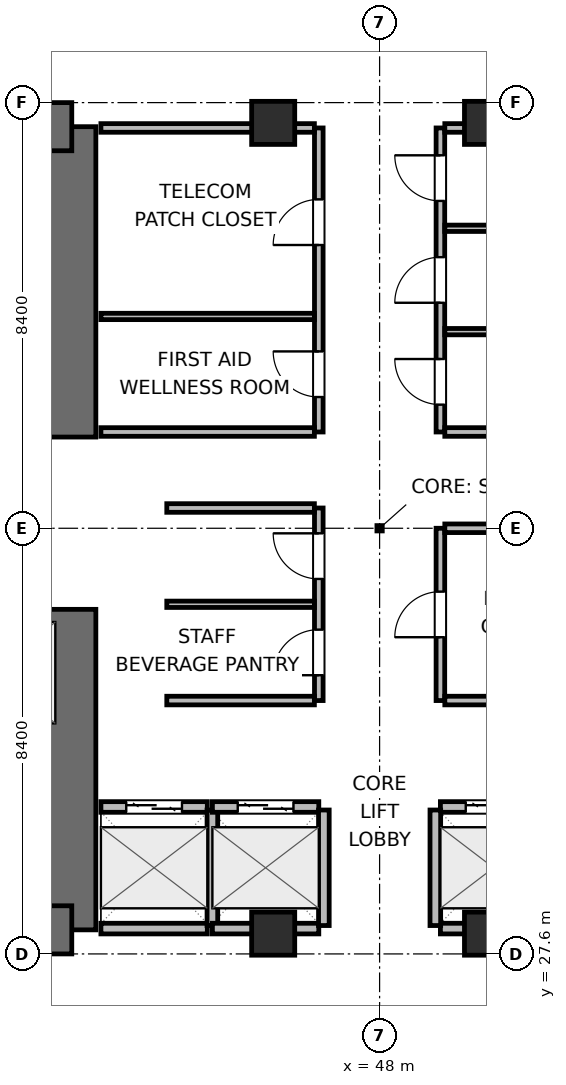
"""IFC4 building model, lengths in metres.
Left out: names, types, materials, properties, quantities, classifications, styles, units other than length and angle.
Written with IfcOpenShell. Run it as: python <this file> out.ifc"""

import sys

from ifc_helpers import new_model, si_unit, direction, frame, frame_2d, origin, origin_2d, place, context, subcontext, project, spatial, rectangle, extrude, element, fill, save


model = new_model("IFC4")
c1 = context("Model", 3, precision=1e-05, world=origin(), true_north=direction((0.0, 1.0)))
c2 = subcontext(c1, "Body", "Model", "MODEL_VIEW")
j1 = project(units=[si_unit("LENGTHUNIT", "METRE"), si_unit("PLANEANGLEUNIT", "RADIAN")], contexts=[c1])
p1 = place(None, origin())
s1 = spatial("IfcSite", under=j1, at=p1, CompositionType="ELEMENT")
p2 = place(p1, origin())
s2 = spatial("IfcBuilding", under=s1, at=p2, CompositionType="ELEMENT")
p3 = place(p2, frame((0.0, 0.0, 60.6)))
s3 = spatial("IfcBuildingStorey", under=s2, at=p3, CompositionType="ELEMENT", Elevation=60.6)
p4 = place(p3, frame((41.925, 28.075, 0.0), z_axis=(0.0, 0.0, 1.0), x_axis=(0.0, 1.0, 0.0)))
e1 = element("IfcWall", 1, at=p4, inside=s3, PredefinedType="SHEAR", context=c2, shape_type="SweptSolid", body=[
    extrude(rectangle(XDim=6.325, YDim=0.95, at=frame_2d((3.163, 0.0))), origin(), (0.0, 0.0, 1.0), 3.9),
])
p5 = place(p3, frame((41.925, 37.8, 0.0), z_axis=(0.0, 0.0, 1.0), x_axis=(0.0, 1.0, 0.0)))
e2 = element("IfcWall", 2, at=p5, inside=s3, PredefinedType="SHEAR", context=c2, shape_type="SweptSolid", body=[
    extrude(rectangle(XDim=6.125, YDim=0.95, at=frame_2d((3.062, 0.0))), origin(), (0.0, 0.0, 1.0), 3.9),
])
p6 = place(p3, frame((32.875, 28.075, 0.0), z_axis=(0.0, 0.0, 1.0), x_axis=(1.0, 0.0, 0.0)))
e3 = element("IfcWall", 3, at=p6, inside=s3, PredefinedType="SHEAR", context=c2, shape_type="SweptSolid", body=[
    extrude(rectangle(XDim=9.05, YDim=0.95, at=frame_2d((4.525, 0.0))), origin(), (0.0, 0.0, 1.0), 3.9),
])
p7 = place(p6, frame((4.975, 0.0, 0.0)))
e4 = element("IfcOpeningElement", 4, at=p7, cuts=e3, PredefinedType="OPENING", context=c2, shape_type="SweptSolid", body=[
    extrude(rectangle(XDim=1.05, YDim=2.04, at=frame_2d((0.525, 1.02))), frame((0.0, 0.485, 0.0), z_axis=(0.0, -1.0, 0.0), x_axis=(1.0, 0.0, 0.0)), (0.0, 0.0, 1.0), 0.97),
])
p8 = place(p3, frame((32.875, 43.925, 0.0), z_axis=(0.0, 0.0, 1.0), x_axis=(1.0, 0.0, 0.0)))
e5 = element("IfcWall", 5, at=p8, inside=s3, PredefinedType="SHEAR", context=c2, shape_type="SweptSolid", body=[
    extrude(rectangle(XDim=9.05, YDim=0.95, at=frame_2d((4.525, 0.0))), origin(), (0.0, 0.0, 1.0), 3.9),
])
p9 = place(p8, frame((0.975, 0.0, 0.0)))
e6 = element("IfcOpeningElement", 6, at=p9, cuts=e5, PredefinedType="OPENING", context=c2, shape_type="SweptSolid", body=[
    extrude(rectangle(XDim=0.95, YDim=2.04, at=frame_2d((0.475, 1.02))), frame((0.0, 0.485, 0.0), z_axis=(0.0, -1.0, 0.0), x_axis=(1.0, 0.0, 0.0)), (0.0, 0.0, 1.0), 0.97),
])
p10 = place(p8, frame((4.225, 0.0, 0.0)))
e7 = element("IfcOpeningElement", 7, at=p10, cuts=e5, PredefinedType="OPENING", context=c2, shape_type="SweptSolid", body=[
    extrude(rectangle(XDim=0.9, YDim=2.02, at=frame_2d((0.45, 1.01))), frame((0.0, 0.485, 0.0), z_axis=(0.0, -1.0, 0.0), x_axis=(1.0, 0.0, 0.0)), (0.0, 0.0, 1.0), 0.97),
])
p11 = place(p8, frame((7.125, 0.0, 0.0)))
e8 = element("IfcOpeningElement", 8, at=p11, cuts=e5, PredefinedType="OPENING", context=c2, shape_type="SweptSolid", body=[
    extrude(rectangle(XDim=0.9, YDim=2.02, at=frame_2d((0.45, 1.01))), frame((0.0, 0.485, 0.0), z_axis=(0.0, -1.0, 0.0), x_axis=(1.0, 0.0, 0.0)), (0.0, 0.0, 1.0), 0.97),
])
for number, where, z_axis, x_axis in (
    (9, (45.9, 28.0, 0.0), (0.0, 0.0, 1.0), (1.0, 0.0, 0.0)),
    (10, (50.1, 28.0, 0.0), (0.0, 0.0, 1.0), (1.0, 0.0, 0.0)),
    (11, (45.9, 44.0, 0.0), (0.0, 0.0, 1.0), (1.0, 0.0, 0.0)),
    (12, (50.1, 44.0, 0.0), (0.0, 0.0, 1.0), (1.0, 0.0, 0.0)),
):
    element("IfcColumn", number, at=place(p3, frame(where, z_axis=z_axis, x_axis=x_axis)), inside=s3, PredefinedType="COLUMN", context=c2, shape_type="SweptSolid", body=[
        extrude(rectangle(XDim=0.85, YDim=0.85, at=origin_2d()), origin(), (0.0, 0.0, 1.0), 3.9),
    ])
p12 = place(p3, frame((42.5, 30.5, 0.0), z_axis=(0.0, 0.0, 1.0), x_axis=(1.0, 0.0, 0.0)))
e13 = element("IfcWall", 13, at=p12, inside=s3, PredefinedType="PARTITIONING", context=c2, shape_type="SweptSolid", body=[
    extrude(rectangle(XDim=2.1, YDim=0.21, at=frame_2d((1.05, 0.0))), origin(), (0.0, 0.0, 1.0), 3.64),
])
p13 = place(p12, frame((0.5, 0.0, 0.0)))
e14 = element("IfcOpeningElement", 14, at=p13, cuts=e13, PredefinedType="OPENING", context=c2, shape_type="SweptSolid", body=[
    extrude(rectangle(XDim=1.1, YDim=2.04, at=frame_2d((0.55, 1.02))), frame((0.0, 0.115, 0.0), z_axis=(0.0, -1.0, 0.0), x_axis=(1.0, 0.0, 0.0)), (0.0, 0.0, 1.0), 0.23),
])
p14 = place(p3, frame((42.5, 28.1, 0.0), z_axis=(0.0, 0.0, 1.0), x_axis=(1.0, 0.0, 0.0)))
e15 = element("IfcWall", 15, at=p14, inside=s3, PredefinedType="PARTITIONING", context=c2, shape_type="SweptSolid", body=[
    extrude(rectangle(XDim=2.1, YDim=0.21, at=frame_2d((1.05, 0.0))), origin(), (0.0, 0.0, 1.0), 2.525),
])
p15 = place(p3, frame((44.7, 28.16, 0.0), z_axis=(0.0, 0.0, 1.0), x_axis=(0.0, 1.0, 0.0)))
e16 = element("IfcWall", 16, at=p15, inside=s3, PredefinedType="PARTITIONING", context=c2, shape_type="SweptSolid", body=[
    extrude(rectangle(XDim=2.28, YDim=0.21, at=frame_2d((1.14, 0.0))), origin(), (0.0, 0.0, 1.0), 3.64),
])
p16 = place(p3, frame((44.7, 30.5, 0.0), z_axis=(0.0, 0.0, 1.0), x_axis=(1.0, 0.0, 0.0)))
e17 = element("IfcWall", 17, at=p16, inside=s3, PredefinedType="PARTITIONING", context=c2, shape_type="SweptSolid", body=[
    extrude(rectangle(XDim=2.1, YDim=0.21, at=frame_2d((1.05, 0.0))), origin(), (0.0, 0.0, 1.0), 3.64),
])
p17 = place(p16, frame((0.5, 0.0, 0.0)))
e18 = element("IfcOpeningElement", 18, at=p17, cuts=e17, PredefinedType="OPENING", context=c2, shape_type="SweptSolid", body=[
    extrude(rectangle(XDim=1.1, YDim=2.04, at=frame_2d((0.55, 1.02))), frame((0.0, 0.115, 0.0), z_axis=(0.0, -1.0, 0.0), x_axis=(1.0, 0.0, 0.0)), (0.0, 0.0, 1.0), 0.23),
])
p18 = place(p3, frame((44.7, 28.1, 0.0), z_axis=(0.0, 0.0, 1.0), x_axis=(1.0, 0.0, 0.0)))
e19 = element("IfcWall", 19, at=p18, inside=s3, PredefinedType="PARTITIONING", context=c2, shape_type="SweptSolid", body=[
    extrude(rectangle(XDim=2.1, YDim=0.21, at=frame_2d((1.05, 0.0))), origin(), (0.0, 0.0, 1.0), 2.525),
])
p19 = place(p3, frame((46.9, 28.16, 0.0), z_axis=(0.0, 0.0, 1.0), x_axis=(0.0, 1.0, 0.0)))
e20 = element("IfcWall", 20, at=p19, inside=s3, PredefinedType="PARTITIONING", context=c2, shape_type="SweptSolid", body=[
    extrude(rectangle(XDim=2.28, YDim=0.21, at=frame_2d((1.14, 0.0))), origin(), (0.0, 0.0, 1.0), 3.64),
])
p20 = place(p3, frame((49.2, 30.5, 0.0), z_axis=(0.0, 0.0, 1.0), x_axis=(1.0, 0.0, 0.0)))
e21 = element("IfcWall", 21, at=p20, inside=s3, PredefinedType="PARTITIONING", context=c2, shape_type="SweptSolid", body=[
    extrude(rectangle(XDim=2.1, YDim=0.21, at=frame_2d((1.05, 0.0))), origin(), (0.0, 0.0, 1.0), 3.64),
])
p21 = place(p20, frame((0.5, 0.0, 0.0)))
e22 = element("IfcOpeningElement", 22, at=p21, cuts=e21, PredefinedType="OPENING", context=c2, shape_type="SweptSolid", body=[
    extrude(rectangle(XDim=1.1, YDim=2.04, at=frame_2d((0.55, 1.02))), frame((0.0, 0.115, 0.0), z_axis=(0.0, -1.0, 0.0), x_axis=(1.0, 0.0, 0.0)), (0.0, 0.0, 1.0), 0.23),
])
p22 = place(p3, frame((49.2, 28.1, 0.0), z_axis=(0.0, 0.0, 1.0), x_axis=(1.0, 0.0, 0.0)))
e23 = element("IfcWall", 23, at=p22, inside=s3, PredefinedType="PARTITIONING", context=c2, shape_type="SweptSolid", body=[
    extrude(rectangle(XDim=2.1, YDim=0.21, at=frame_2d((1.05, 0.0))), origin(), (0.0, 0.0, 1.0), 2.525),
])
p23 = place(p3, frame((49.1, 28.16, 0.0), z_axis=(0.0, 0.0, 1.0), x_axis=(0.0, 1.0, 0.0)))
e24 = element("IfcWall", 24, at=p23, inside=s3, PredefinedType="PARTITIONING", context=c2, shape_type="SweptSolid", body=[
    extrude(rectangle(XDim=2.28, YDim=0.21, at=frame_2d((1.14, 0.0))), origin(), (0.0, 0.0, 1.0), 3.64),
])
p24 = place(p3, frame((46.8, 32.6, 0.0), z_axis=(0.0, 0.0, 1.0), x_axis=(0.0, 1.0, 0.0)))
e25 = element("IfcWall", 25, at=p24, inside=s3, PredefinedType="PARTITIONING", context=c2, shape_type="SweptSolid", body=[
    extrude(rectangle(XDim=3.8, YDim=0.17, at=frame_2d((1.9, 0.0))), origin(), (0.0, 0.0, 1.0), 3.64),
])
p25 = place(p24, frame((0.5, 0.0, 0.0)))
e26 = element("IfcOpeningElement", 26, at=p25, cuts=e25, PredefinedType="OPENING", context=c2, shape_type="SweptSolid", body=[
    extrude(rectangle(XDim=0.9, YDim=2.02, at=frame_2d((0.45, 1.01))), frame((0.0, 0.095, 0.0), z_axis=(0.0, -1.0, 0.0), x_axis=(1.0, 0.0, 0.0)), (0.0, 0.0, 1.0), 0.19),
])
p26 = place(p24, frame((2.4, 0.0, 0.0)))
e27 = element("IfcOpeningElement", 27, at=p26, cuts=e25, PredefinedType="OPENING", context=c2, shape_type="SweptSolid", body=[
    extrude(rectangle(XDim=0.9, YDim=2.02, at=frame_2d((0.45, 1.01))), frame((0.0, 0.095, 0.0), z_axis=(0.0, -1.0, 0.0), x_axis=(1.0, 0.0, 0.0)), (0.0, 0.0, 1.0), 0.19),
])
for number, where, z_axis, x_axis in (
    (28, (43.8, 32.6, 0.0), (0.0, 0.0, 1.0), (1.0, 0.0, 0.0)),
    (29, (43.8, 36.4, 0.0), (0.0, 0.0, 1.0), (1.0, 0.0, 0.0)),
):
    element("IfcWall", number, at=place(p3, frame(where, z_axis=z_axis, x_axis=x_axis)), inside=s3, PredefinedType="PARTITIONING", context=c2, shape_type="SweptSolid", body=[
        extrude(rectangle(XDim=2.913, YDim=0.17, at=frame_2d((1.457, 0.0))), origin(), (0.0, 0.0, 1.0), 3.64),
    ])
p27 = place(p3, frame((43.8, 34.5, 0.0), z_axis=(0.0, 0.0, 1.0), x_axis=(1.0, 0.0, 0.0)))
e30 = element("IfcWall", 30, at=p27, inside=s3, PredefinedType="PARTITIONING", context=c2, shape_type="SweptSolid", body=[
    extrude(rectangle(XDim=2.913, YDim=0.125, at=frame_2d((1.457, 0.0))), origin(), (0.0, 0.0, 1.0), 3.64),
])
p28 = place(p3, frame((49.2, 32.6, 0.0), z_axis=(0.0, 0.0, 1.0), x_axis=(0.0, 1.0, 0.0)))
e31 = element("IfcWall", 31, at=p28, inside=s3, PredefinedType="PARTITIONING", context=c2, shape_type="SweptSolid", body=[
    extrude(rectangle(XDim=3.4, YDim=0.17, at=frame_2d((1.7, 0.0))), origin(), (0.0, 0.0, 1.0), 3.64),
])
p29 = place(p28, frame((1.25, 0.0, 0.0)))
e32 = element("IfcOpeningElement", 32, at=p29, cuts=e31, PredefinedType="OPENING", context=c2, shape_type="SweptSolid", body=[
    extrude(rectangle(XDim=0.9, YDim=2.02, at=frame_2d((0.45, 1.01))), frame((0.0, 0.095, 0.0), z_axis=(0.0, -1.0, 0.0), x_axis=(1.0, 0.0, 0.0)), (0.0, 0.0, 1.0), 0.19),
])
for number, where, z_axis, x_axis in (
    (33, (49.287, 32.6, 0.0), (0.0, 0.0, 1.0), (1.0, 0.0, 0.0)),
    (34, (49.287, 36.0, 0.0), (0.0, 0.0, 1.0), (1.0, 0.0, 0.0)),
):
    element("IfcWall", number, at=place(p3, frame(where, z_axis=z_axis, x_axis=x_axis)), inside=s3, PredefinedType="PARTITIONING", context=c2, shape_type="SweptSolid", body=[
        extrude(rectangle(XDim=2.913, YDim=0.17, at=frame_2d((1.457, 0.0))), origin(), (0.0, 0.0, 1.0), 3.64),
    ])
p30 = place(p3, frame((46.8, 37.9, 0.0), z_axis=(0.0, 0.0, 1.0), x_axis=(0.0, 1.0, 0.0)))
e35 = element("IfcWall", 35, at=p30, inside=s3, PredefinedType="PARTITIONING", context=c2, shape_type="SweptSolid", body=[
    extrude(rectangle(XDim=6.0, YDim=0.17, at=frame_2d((3.0, 0.0))), origin(), (0.0, 0.0, 1.0), 3.64),
])
p31 = place(p30, frame((0.69, 0.0, 0.0)))
e36 = element("IfcOpeningElement", 36, at=p31, cuts=e35, PredefinedType="OPENING", context=c2, shape_type="SweptSolid", body=[
    extrude(rectangle(XDim=0.9, YDim=2.02, at=frame_2d((0.45, 1.01))), frame((0.0, 0.095, 0.0), z_axis=(0.0, -1.0, 0.0), x_axis=(1.0, 0.0, 0.0)), (0.0, 0.0, 1.0), 0.19),
])
p32 = place(p30, frame((3.69, 0.0, 0.0)))
e37 = element("IfcOpeningElement", 37, at=p32, cuts=e35, PredefinedType="OPENING", context=c2, shape_type="SweptSolid", body=[
    extrude(rectangle(XDim=0.9, YDim=2.02, at=frame_2d((0.45, 1.01))), frame((0.0, 0.095, 0.0), z_axis=(0.0, -1.0, 0.0), x_axis=(1.0, 0.0, 0.0)), (0.0, 0.0, 1.0), 0.19),
])
p33 = place(p3, frame((42.5, 37.9, 0.0), z_axis=(0.0, 0.0, 1.0), x_axis=(1.0, 0.0, 0.0)))
e38 = element("IfcWall", 38, at=p33, inside=s3, PredefinedType="PARTITIONING", context=c2, shape_type="SweptSolid", body=[
    extrude(rectangle(XDim=4.213, YDim=0.17, at=frame_2d((2.106, 0.0))), origin(), (0.0, 0.0, 1.0), 3.64),
])
p34 = place(p3, frame((42.5, 43.9, 0.0), z_axis=(0.0, 0.0, 1.0), x_axis=(1.0, 0.0, 0.0)))
e39 = element("IfcWall", 39, at=p34, inside=s3, PredefinedType="PARTITIONING", context=c2, shape_type="SweptSolid", body=[
    extrude(rectangle(XDim=4.213, YDim=0.17, at=frame_2d((2.106, 0.0))), origin(), (0.0, 0.0, 1.0), 2.525),
])
p35 = place(p3, frame((42.5, 40.18, 0.0), z_axis=(0.0, 0.0, 1.0), x_axis=(1.0, 0.0, 0.0)))
e40 = element("IfcWall", 40, at=p35, inside=s3, PredefinedType="PARTITIONING", context=c2, shape_type="SweptSolid", body=[
    extrude(rectangle(XDim=4.213, YDim=0.125, at=frame_2d((2.106, 0.0))), origin(), (0.0, 0.0, 1.0), 3.64),
])
p36 = place(p3, frame((49.2, 37.9, 0.0), z_axis=(0.0, 0.0, 1.0), x_axis=(0.0, 1.0, 0.0)))
e41 = element("IfcWall", 41, at=p36, inside=s3, PredefinedType="PARTITIONING", context=c2, shape_type="SweptSolid", body=[
    extrude(rectangle(XDim=6.0, YDim=0.17, at=frame_2d((3.0, 0.0))), origin(), (0.0, 0.0, 1.0), 3.64),
])
p37 = place(p36, frame((0.54, 0.0, 0.0)))
e42 = element("IfcOpeningElement", 42, at=p37, cuts=e41, PredefinedType="OPENING", context=c2, shape_type="SweptSolid", body=[
    extrude(rectangle(XDim=0.9, YDim=2.02, at=frame_2d((0.45, 1.01))), frame((0.0, 0.095, 0.0), z_axis=(0.0, -1.0, 0.0), x_axis=(1.0, 0.0, 0.0)), (0.0, 0.0, 1.0), 0.19),
])
p38 = place(p36, frame((2.55, 0.0, 0.0)))
e43 = element("IfcOpeningElement", 43, at=p38, cuts=e41, PredefinedType="OPENING", context=c2, shape_type="SweptSolid", body=[
    extrude(rectangle(XDim=0.9, YDim=2.02, at=frame_2d((0.45, 1.01))), frame((0.0, 0.095, 0.0), z_axis=(0.0, -1.0, 0.0), x_axis=(1.0, 0.0, 0.0)), (0.0, 0.0, 1.0), 0.19),
])
p39 = place(p36, frame((4.56, 0.0, 0.0)))
e44 = element("IfcOpeningElement", 44, at=p39, cuts=e41, PredefinedType="OPENING", context=c2, shape_type="SweptSolid", body=[
    extrude(rectangle(XDim=0.9, YDim=2.02, at=frame_2d((0.45, 1.01))), frame((0.0, 0.095, 0.0), z_axis=(0.0, -1.0, 0.0), x_axis=(1.0, 0.0, 0.0)), (0.0, 0.0, 1.0), 0.19),
])
p40 = place(p3, frame((49.287, 37.9, 0.0), z_axis=(0.0, 0.0, 1.0), x_axis=(1.0, 0.0, 0.0)))
e45 = element("IfcWall", 45, at=p40, inside=s3, PredefinedType="PARTITIONING", context=c2, shape_type="SweptSolid", body=[
    extrude(rectangle(XDim=4.113, YDim=0.17, at=frame_2d((2.056, 0.0))), origin(), (0.0, 0.0, 1.0), 3.64),
])
p41 = place(p3, frame((49.287, 43.9, 0.0), z_axis=(0.0, 0.0, 1.0), x_axis=(1.0, 0.0, 0.0)))
e46 = element("IfcWall", 46, at=p41, inside=s3, PredefinedType="PARTITIONING", context=c2, shape_type="SweptSolid", body=[
    extrude(rectangle(XDim=4.113, YDim=0.17, at=frame_2d((2.056, 0.0))), origin(), (0.0, 0.0, 1.0), 2.525),
])
for number, where, z_axis, x_axis in (
    (47, (49.287, 39.88, 0.0), (0.0, 0.0, 1.0), (1.0, 0.0, 0.0)),
    (48, (49.287, 41.92, 0.0), (0.0, 0.0, 1.0), (1.0, 0.0, 0.0)),
):
    element("IfcWall", number, at=place(p3, frame(where, z_axis=z_axis, x_axis=x_axis)), inside=s3, PredefinedType="PARTITIONING", context=c2, shape_type="SweptSolid", body=[
        extrude(rectangle(XDim=4.113, YDim=0.125, at=frame_2d((2.056, 0.0))), origin(), (0.0, 0.0, 1.0), 3.64),
    ])
p42 = place(p13, origin())
e49 = element("IfcDoor", 49, at=p42, inside=s3, OperationType="DOUBLE_DOOR_SLIDING", PredefinedType="DOOR", context=c2, shape_type="SweptSolid", body=[
    extrude(rectangle(XDim=1.1, YDim=2.04, at=frame_2d((0.55, 1.02))), frame((0.0, 0.025, 0.0), z_axis=(0.0, -1.0, 0.0), x_axis=(1.0, 0.0, 0.0)), (0.0, 0.0, 1.0), 0.05),
])
fill(e14, e49)
p43 = place(p17, origin())
e50 = element("IfcDoor", 50, at=p43, inside=s3, OperationType="DOUBLE_DOOR_SLIDING", PredefinedType="DOOR", context=c2, shape_type="SweptSolid", body=[
    extrude(rectangle(XDim=1.1, YDim=2.04, at=frame_2d((0.55, 1.02))), frame((0.0, 0.025, 0.0), z_axis=(0.0, -1.0, 0.0), x_axis=(1.0, 0.0, 0.0)), (0.0, 0.0, 1.0), 0.05),
])
fill(e18, e50)
p44 = place(p21, origin())
e51 = element("IfcDoor", 51, at=p44, inside=s3, OperationType="DOUBLE_DOOR_SLIDING", PredefinedType="DOOR", context=c2, shape_type="SweptSolid", body=[
    extrude(rectangle(XDim=1.1, YDim=2.04, at=frame_2d((0.55, 1.02))), frame((0.0, 0.025, 0.0), z_axis=(0.0, -1.0, 0.0), x_axis=(1.0, 0.0, 0.0)), (0.0, 0.0, 1.0), 0.05),
])
fill(e22, e51)
p45 = place(p25, origin())
e52 = element("IfcDoor", 52, at=p45, inside=s3, OperationType="SINGLE_SWING_LEFT", PredefinedType="DOOR", context=c2, shape_type="SweptSolid", body=[
    extrude(rectangle(XDim=0.9, YDim=2.02, at=frame_2d((0.45, 1.01))), frame((0.0, 0.025, 0.0), z_axis=(0.0, -1.0, 0.0), x_axis=(1.0, 0.0, 0.0)), (0.0, 0.0, 1.0), 0.05),
])
fill(e26, e52)
p46 = place(p26, origin())
e53 = element("IfcDoor", 53, at=p46, inside=s3, OperationType="SINGLE_SWING_RIGHT", PredefinedType="DOOR", context=c2, shape_type="SweptSolid", body=[
    extrude(rectangle(XDim=0.9, YDim=2.02, at=frame_2d((0.45, 1.01))), frame((0.0, 0.025, 0.0), z_axis=(0.0, -1.0, 0.0), x_axis=(1.0, 0.0, 0.0)), (0.0, 0.0, 1.0), 0.05),
])
fill(e27, e53)
p47 = place(p29, origin())
e54 = element("IfcDoor", 54, at=p47, inside=s3, OperationType="SINGLE_SWING_LEFT", PredefinedType="DOOR", context=c2, shape_type="SweptSolid", body=[
    extrude(rectangle(XDim=0.9, YDim=2.02, at=frame_2d((0.45, 1.01))), frame((0.0, 0.025, 0.0), z_axis=(0.0, -1.0, 0.0), x_axis=(1.0, 0.0, 0.0)), (0.0, 0.0, 1.0), 0.05),
])
fill(e32, e54)
p48 = place(p31, origin())
e55 = element("IfcDoor", 55, at=p48, inside=s3, OperationType="SINGLE_SWING_RIGHT", PredefinedType="DOOR", context=c2, shape_type="SweptSolid", body=[
    extrude(rectangle(XDim=0.9, YDim=2.02, at=frame_2d((0.45, 1.01))), frame((0.0, 0.025, 0.0), z_axis=(0.0, -1.0, 0.0), x_axis=(1.0, 0.0, 0.0)), (0.0, 0.0, 1.0), 0.05),
])
fill(e36, e55)
p49 = place(p32, origin())
e56 = element("IfcDoor", 56, at=p49, inside=s3, OperationType="SINGLE_SWING_LEFT", PredefinedType="DOOR", context=c2, shape_type="SweptSolid", body=[
    extrude(rectangle(XDim=0.9, YDim=2.02, at=frame_2d((0.45, 1.01))), frame((0.0, 0.025, 0.0), z_axis=(0.0, -1.0, 0.0), x_axis=(1.0, 0.0, 0.0)), (0.0, 0.0, 1.0), 0.05),
])
fill(e37, e56)
p50 = place(p37, origin())
e57 = element("IfcDoor", 57, at=p50, inside=s3, OperationType="SINGLE_SWING_RIGHT", PredefinedType="DOOR", context=c2, shape_type="SweptSolid", body=[
    extrude(rectangle(XDim=0.9, YDim=2.02, at=frame_2d((0.45, 1.01))), frame((0.0, 0.025, 0.0), z_axis=(0.0, -1.0, 0.0), x_axis=(1.0, 0.0, 0.0)), (0.0, 0.0, 1.0), 0.05),
])
fill(e42, e57)
p51 = place(p38, origin())
e58 = element("IfcDoor", 58, at=p51, inside=s3, OperationType="SINGLE_SWING_LEFT", PredefinedType="DOOR", context=c2, shape_type="SweptSolid", body=[
    extrude(rectangle(XDim=0.9, YDim=2.02, at=frame_2d((0.45, 1.01))), frame((0.0, 0.025, 0.0), z_axis=(0.0, -1.0, 0.0), x_axis=(1.0, 0.0, 0.0)), (0.0, 0.0, 1.0), 0.05),
])
fill(e43, e58)
p52 = place(p39, origin())
e59 = element("IfcDoor", 59, at=p52, inside=s3, OperationType="SINGLE_SWING_RIGHT", PredefinedType="DOOR", context=c2, shape_type="SweptSolid", body=[
    extrude(rectangle(XDim=0.9, YDim=2.02, at=frame_2d((0.45, 1.01))), frame((0.0, 0.025, 0.0), z_axis=(0.0, -1.0, 0.0), x_axis=(1.0, 0.0, 0.0)), (0.0, 0.0, 1.0), 0.05),
])
fill(e44, e59)
save(model, sys.argv[1])
